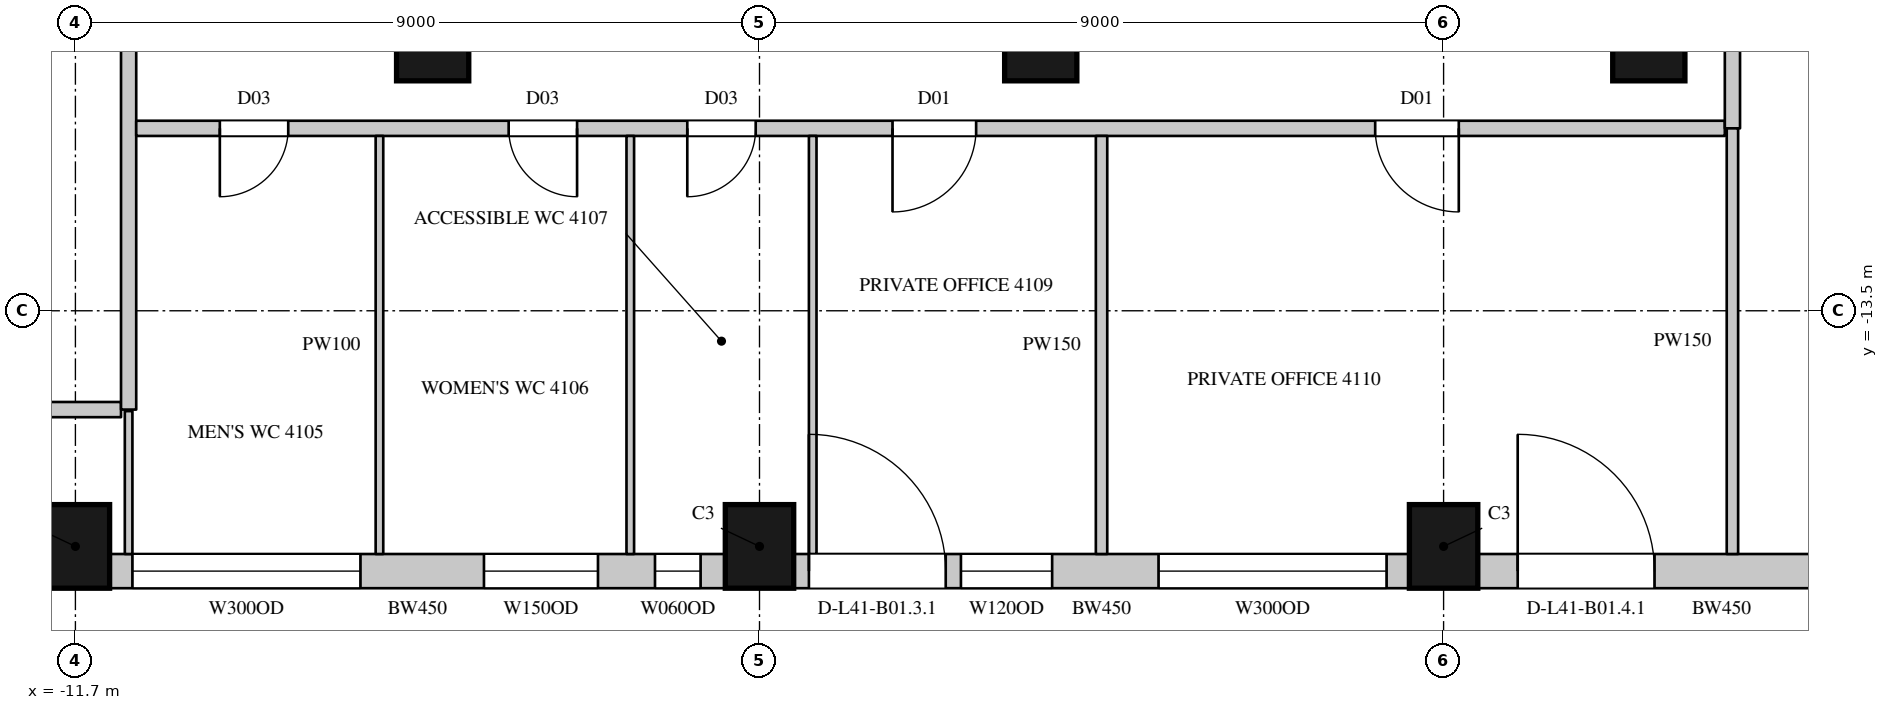
"""IFC4 building model, lengths in metres.
Left out: names, types, materials, properties, quantities, classifications, styles, units other than length and angle.
Written with IfcOpenShell. Run it as: python <this file> out.ifc"""

import sys

from ifc_helpers import new_model, si_unit, direction, frame, frame_2d, origin, origin_2d, place, context, subcontext, project, spatial, rectangle, circle, extrude, element, fill, save


model = new_model("IFC4")
c1 = context("Model", 3, precision=1e-05, world=origin(), true_north=direction((0.0, 1.0)))
c2 = subcontext(c1, "Body", "Model", "MODEL_VIEW")
j1 = project(units=[si_unit("LENGTHUNIT", "METRE"), si_unit("PLANEANGLEUNIT", "RADIAN")], contexts=[c1])
p1 = place(None, origin())
s1 = spatial("IfcSite", under=j1, at=p1, CompositionType="ELEMENT")
p2 = place(p1, origin())
s2 = spatial("IfcBuilding", under=s1, at=p2, CompositionType="ELEMENT")
p3 = place(p2, frame((0.0, 0.0, 189.2)))
s3 = spatial("IfcBuildingStorey", under=s2, at=p3, CompositionType="ELEMENT", Elevation=189.2)
for number, where, z_axis, x_axis in (
    (1, (-11.7, -16.6, 0.0), (0.0, 0.0, 1.0), (1.0, 0.0, 0.0)),
    (2, (-2.7, -16.6, 0.0), (0.0, 0.0, 1.0), (1.0, 0.0, 0.0)),
    (3, (6.3, -16.6, 0.0), (0.0, 0.0, 1.0), (1.0, 0.0, 0.0)),
):
    element("IfcColumn", number, at=place(p3, frame(where, z_axis=z_axis, x_axis=x_axis)), inside=s3, PredefinedType="COLUMN", context=c2, shape_type="SweptSolid", body=[
        extrude(rectangle(XDim=0.9, YDim=1.1, at=origin_2d()), origin(), (0.0, 0.0, 1.0), 4.1),
    ])
for number, where, z_axis, x_axis in (
    (4, (-7.0, -10.0, 0.0), (0.0, 0.0, 1.0), (1.0, 0.0, 0.0)),
    (5, (1.0, -10.0, 0.0), (0.0, 0.0, 1.0), (1.0, 0.0, 0.0)),
    (6, (9.0, -10.0, 0.0), (0.0, 0.0, 1.0), (1.0, 0.0, 0.0)),
):
    element("IfcColumn", number, at=place(p3, frame(where, z_axis=z_axis, x_axis=x_axis)), inside=s3, PredefinedType="COLUMN", context=c2, shape_type="SweptSolid", body=[
        extrude(circle(Radius=0.475, at=origin_2d()), origin(), (0.0, 0.0, 1.0), 4.1),
    ])
p4 = place(p3, frame((-11.25, -16.925, 0.0), z_axis=(0.0, 0.0, 1.0), x_axis=(1.0, 0.0, 0.0)))
e7 = element("IfcWall", 7, at=p4, inside=s3, PredefinedType="SOLIDWALL", context=c2, shape_type="SweptSolid", body=[
    extrude(rectangle(XDim=8.1, YDim=0.45, at=frame_2d((4.05, 0.0))), origin(), (0.0, 0.0, 1.0), 3.8),
])
p5 = place(p4, frame((0.3, 0.0, 1.05)))
e8 = element("IfcOpeningElement", 8, at=p5, cuts=e7, PredefinedType="OPENING", context=c2, shape_type="SweptSolid", body=[
    extrude(rectangle(XDim=3.0, YDim=2.4, at=frame_2d((1.5, 1.2))), frame((0.0, 0.235, 0.0), z_axis=(0.0, -1.0, 0.0), x_axis=(1.0, 0.0, 0.0)), (0.0, 0.0, 1.0), 0.47),
])
p6 = place(p4, frame((4.925, 0.0, 1.05)))
e9 = element("IfcOpeningElement", 9, at=p6, cuts=e7, PredefinedType="OPENING", context=c2, shape_type="SweptSolid", body=[
    extrude(rectangle(XDim=1.5, YDim=2.4, at=frame_2d((0.75, 1.2))), frame((0.0, 0.235, 0.0), z_axis=(0.0, -1.0, 0.0), x_axis=(1.0, 0.0, 0.0)), (0.0, 0.0, 1.0), 0.47),
])
p7 = place(p4, frame((7.175, 0.0, 1.05)))
e10 = element("IfcOpeningElement", 10, at=p7, cuts=e7, PredefinedType="OPENING", context=c2, shape_type="SweptSolid", body=[
    extrude(rectangle(XDim=0.6, YDim=2.4, at=frame_2d((0.3, 1.2))), frame((0.0, 0.235, 0.0), z_axis=(0.0, -1.0, 0.0), x_axis=(1.0, 0.0, 0.0)), (0.0, 0.0, 1.0), 0.47),
])
p8 = place(p3, frame((-2.25, -16.925, 0.0), z_axis=(0.0, 0.0, 1.0), x_axis=(1.0, 0.0, 0.0)))
e11 = element("IfcWall", 11, at=p8, inside=s3, PredefinedType="SOLIDWALL", context=c2, shape_type="SweptSolid", body=[
    extrude(rectangle(XDim=8.1, YDim=0.45, at=frame_2d((4.05, 0.0))), origin(), (0.0, 0.0, 1.0), 3.8),
])
p9 = place(p8, frame((0.2, 0.0, 0.0)))
e12 = element("IfcOpeningElement", 12, at=p9, cuts=e11, PredefinedType="OPENING", context=c2, shape_type="SweptSolid", body=[
    extrude(rectangle(XDim=1.8, YDim=2.4, at=frame_2d((0.9, 1.2))), frame((0.0, 0.235, 0.0), z_axis=(0.0, -1.0, 0.0), x_axis=(1.0, 0.0, 0.0)), (0.0, 0.0, 1.0), 0.47),
])
p10 = place(p8, frame((2.2, 0.0, 1.05)))
e13 = element("IfcOpeningElement", 13, at=p10, cuts=e11, PredefinedType="OPENING", context=c2, shape_type="SweptSolid", body=[
    extrude(rectangle(XDim=1.2, YDim=2.4, at=frame_2d((0.6, 1.2))), frame((0.0, 0.235, 0.0), z_axis=(0.0, -1.0, 0.0), x_axis=(1.0, 0.0, 0.0)), (0.0, 0.0, 1.0), 0.47),
])
p11 = place(p8, frame((4.8, 0.0, 1.05)))
e14 = element("IfcOpeningElement", 14, at=p11, cuts=e11, PredefinedType="OPENING", context=c2, shape_type="SweptSolid", body=[
    extrude(rectangle(XDim=3.0, YDim=2.4, at=frame_2d((1.5, 1.2))), frame((0.0, 0.235, 0.0), z_axis=(0.0, -1.0, 0.0), x_axis=(1.0, 0.0, 0.0)), (0.0, 0.0, 1.0), 0.47),
])
p12 = place(p3, frame((6.75, -16.925, 0.0), z_axis=(0.0, 0.0, 1.0), x_axis=(1.0, 0.0, 0.0)))
e15 = element("IfcWall", 15, at=p12, inside=s3, PredefinedType="SOLIDWALL", context=c2, shape_type="SweptSolid", body=[
    extrude(rectangle(XDim=6.414, YDim=0.45, at=frame_2d((3.207, 0.0))), origin(), (0.0, 0.0, 1.0), 3.8),
])
p13 = place(p12, frame((0.525, 0.0, 0.0)))
e16 = element("IfcOpeningElement", 16, at=p13, cuts=e15, PredefinedType="OPENING", context=c2, shape_type="SweptSolid", body=[
    extrude(rectangle(XDim=1.8, YDim=2.4, at=frame_2d((0.9, 1.2))), frame((0.0, 0.235, 0.0), z_axis=(0.0, -1.0, 0.0), x_axis=(1.0, 0.0, 0.0)), (0.0, 0.0, 1.0), 0.47),
])
p14 = place(p3, frame((-13.97, -14.8, 0.0), z_axis=(0.0, 0.0, 1.0), x_axis=(1.0, 0.0, 0.0)))
e17 = element("IfcWall", 17, at=p14, inside=s3, PredefinedType="PARTITIONING", context=c2, shape_type="SweptSolid", body=[
    extrude(rectangle(XDim=2.87, YDim=0.2, at=frame_2d((1.435, 0.0))), origin(), (0.0, 0.0, 1.0), 3.8),
])
p15 = place(p3, frame((-11.0, -14.8, 0.0), z_axis=(0.0, 0.0, 1.0), x_axis=(0.0, 1.0, 0.0)))
e18 = element("IfcWall", 18, at=p15, inside=s3, PredefinedType="PARTITIONING", context=c2, shape_type="SweptSolid", body=[
    extrude(rectangle(XDim=29.6, YDim=0.2, at=frame_2d((14.8, 0.0))), origin(), (0.0, 0.0, 1.0), 3.8),
])
p16 = place(p15, frame((20.15, 0.0, 0.0)))
e19 = element("IfcOpeningElement", 19, at=p16, cuts=e18, PredefinedType="OPENING", context=c2, shape_type="SweptSolid", body=[
    extrude(rectangle(XDim=1.5, YDim=2.4, at=frame_2d((0.75, 1.2))), frame((0.0, 0.11, 0.0), z_axis=(0.0, -1.0, 0.0), x_axis=(1.0, 0.0, 0.0)), (0.0, 0.0, 1.0), 0.22),
])
p17 = place(p3, frame((-10.9, -11.1, 0.0), z_axis=(0.0, 0.0, 1.0), x_axis=(1.0, 0.0, 0.0)))
e20 = element("IfcWall", 20, at=p17, inside=s3, PredefinedType="PARTITIONING", context=c2, shape_type="SweptSolid", body=[
    extrude(rectangle(XDim=20.9, YDim=0.2, at=frame_2d((10.45, 0.0))), origin(), (0.0, 0.0, 1.0), 3.8),
])
p18 = place(p17, frame((1.1, 0.0, 0.0)))
e21 = element("IfcOpeningElement", 21, at=p18, cuts=e20, PredefinedType="OPENING", context=c2, shape_type="SweptSolid", body=[
    extrude(rectangle(XDim=0.9, YDim=2.2, at=frame_2d((0.45, 1.1))), frame((0.0, 0.11, 0.0), z_axis=(0.0, -1.0, 0.0), x_axis=(1.0, 0.0, 0.0)), (0.0, 0.0, 1.0), 0.22),
])
p19 = place(p17, frame((4.9, 0.0, 0.0)))
e22 = element("IfcOpeningElement", 22, at=p19, cuts=e20, PredefinedType="OPENING", context=c2, shape_type="SweptSolid", body=[
    extrude(rectangle(XDim=0.9, YDim=2.2, at=frame_2d((0.45, 1.1))), frame((0.0, 0.11, 0.0), z_axis=(0.0, -1.0, 0.0), x_axis=(1.0, 0.0, 0.0)), (0.0, 0.0, 1.0), 0.22),
])
p20 = place(p17, frame((7.25, 0.0, 0.0)))
e23 = element("IfcOpeningElement", 23, at=p20, cuts=e20, PredefinedType="OPENING", context=c2, shape_type="SweptSolid", body=[
    extrude(rectangle(XDim=0.9, YDim=2.2, at=frame_2d((0.45, 1.1))), frame((0.0, 0.11, 0.0), z_axis=(0.0, -1.0, 0.0), x_axis=(1.0, 0.0, 0.0)), (0.0, 0.0, 1.0), 0.22),
])
p21 = place(p17, frame((9.95, 0.0, 0.0)))
e24 = element("IfcOpeningElement", 24, at=p21, cuts=e20, PredefinedType="OPENING", context=c2, shape_type="SweptSolid", body=[
    extrude(rectangle(XDim=1.1, YDim=2.4, at=frame_2d((0.55, 1.2))), frame((0.0, 0.11, 0.0), z_axis=(0.0, -1.0, 0.0), x_axis=(1.0, 0.0, 0.0)), (0.0, 0.0, 1.0), 0.22),
])
p22 = place(p17, frame((16.3, 0.0, 0.0)))
e25 = element("IfcOpeningElement", 25, at=p22, cuts=e20, PredefinedType="OPENING", context=c2, shape_type="SweptSolid", body=[
    extrude(rectangle(XDim=1.1, YDim=2.4, at=frame_2d((0.55, 1.2))), frame((0.0, 0.11, 0.0), z_axis=(0.0, -1.0, 0.0), x_axis=(1.0, 0.0, 0.0)), (0.0, 0.0, 1.0), 0.22),
])
p23 = place(p3, frame((10.1, -11.1, 0.0), z_axis=(0.0, 0.0, 1.0), x_axis=(0.0, 1.0, 0.0)))
e26 = element("IfcWall", 26, at=p23, inside=s3, PredefinedType="PARTITIONING", context=c2, shape_type="SweptSolid", body=[
    extrude(rectangle(XDim=23.2, YDim=0.2, at=frame_2d((11.6, 0.0))), origin(), (0.0, 0.0, 1.0), 3.8),
])
p24 = place(p23, frame((8.0, 0.0, 0.0)))
e27 = element("IfcOpeningElement", 27, at=p24, cuts=e26, PredefinedType="OPENING", context=c2, shape_type="SweptSolid", body=[
    extrude(rectangle(XDim=1.5, YDim=2.4, at=frame_2d((0.75, 1.2))), frame((0.0, 0.11, 0.0), z_axis=(0.0, -1.0, 0.0), x_axis=(1.0, 0.0, 0.0)), (0.0, 0.0, 1.0), 0.22),
])
p25 = place(p23, frame((18.95, 0.0, 0.0)))
e28 = element("IfcOpeningElement", 28, at=p25, cuts=e26, PredefinedType="OPENING", context=c2, shape_type="SweptSolid", body=[
    extrude(rectangle(XDim=1.1, YDim=2.4, at=frame_2d((0.55, 1.2))), frame((0.0, 0.11, 0.0), z_axis=(0.0, -1.0, 0.0), x_axis=(1.0, 0.0, 0.0)), (0.0, 0.0, 1.0), 0.22),
])
p26 = place(p23, frame((2.7, 0.0, 0.0)))
e29 = element("IfcOpeningElement", 29, at=p26, cuts=e26, PredefinedType="OPENING", context=c2, shape_type="SweptSolid", body=[
    extrude(rectangle(XDim=1.1, YDim=2.4, at=frame_2d((0.55, 1.2))), frame((0.0, 0.11, 0.0), z_axis=(0.0, -1.0, 0.0), x_axis=(1.0, 0.0, 0.0)), (0.0, 0.0, 1.0), 0.22),
])
p27 = place(p3, frame((1.8, -16.7, 0.0), z_axis=(0.0, 0.0, 1.0), x_axis=(0.0, 1.0, 0.0)))
e30 = element("IfcWall", 30, at=p27, inside=s3, PredefinedType="PARTITIONING", context=c2, shape_type="SweptSolid", body=[
    extrude(rectangle(XDim=5.5, YDim=0.15, at=frame_2d((2.75, 0.0))), origin(), (0.0, 0.0, 1.0), 3.15),
])
p28 = place(p3, frame((10.1, -16.7, 0.0), z_axis=(0.0, 0.0, 1.0), x_axis=(0.0, 1.0, 0.0)))
e31 = element("IfcWall", 31, at=p28, inside=s3, PredefinedType="PARTITIONING", context=c2, shape_type="SweptSolid", body=[
    extrude(rectangle(XDim=5.6, YDim=0.15, at=frame_2d((2.8, 0.0))), origin(), (0.0, 0.0, 1.0), 3.8),
])
p29 = place(p3, frame((-11.0, -16.7, 0.0), z_axis=(0.0, 0.0, 1.0), x_axis=(0.0, 1.0, 0.0)))
e32 = element("IfcWall", 32, at=p29, inside=s3, PredefinedType="PARTITIONING", context=c2, shape_type="SweptSolid", body=[
    extrude(rectangle(XDim=1.88, YDim=0.1, at=frame_2d((0.94, 0.0))), origin(), (0.0, 0.0, 1.0), 3.8),
])
for number, where, z_axis, x_axis in (
    (33, (-7.7, -16.7, 0.0), (0.0, 0.0, 1.0), (0.0, 1.0, 0.0)),
    (34, (-4.4, -16.7, 0.0), (0.0, 0.0, 1.0), (0.0, 1.0, 0.0)),
    (35, (-2.0, -16.7, 0.0), (0.0, 0.0, 1.0), (0.0, 1.0, 0.0)),
):
    element("IfcWall", number, at=place(p3, frame(where, z_axis=z_axis, x_axis=x_axis)), inside=s3, PredefinedType="PARTITIONING", context=c2, shape_type="SweptSolid", body=[
        extrude(rectangle(XDim=5.5, YDim=0.1, at=frame_2d((2.75, 0.0))), origin(), (0.0, 0.0, 1.0), 3.8),
    ])
p30 = place(p5, origin())
e36 = element("IfcWindow", 36, at=p30, inside=s3, PartitioningType="SINGLE_PANEL", PredefinedType="WINDOW", context=c2, shape_type="SweptSolid", body=[
    extrude(rectangle(XDim=3.0, YDim=2.4, at=frame_2d((1.5, 1.2))), frame((0.0, 0.135, 0.0), z_axis=(0.0, -1.0, 0.0), x_axis=(1.0, 0.0, 0.0)), (0.0, 0.0, 1.0), 0.06),
])
fill(e8, e36)
p31 = place(p9, origin())
e37 = element("IfcDoor", 37, at=p31, inside=s3, OperationType="SLIDING_TO_LEFT", PredefinedType="DOOR", context=c2, shape_type="SweptSolid", body=[
    extrude(rectangle(XDim=1.8, YDim=2.4, at=frame_2d((0.9, 1.2))), frame((0.0, 0.13, 0.0), z_axis=(0.0, -1.0, 0.0), x_axis=(1.0, 0.0, 0.0)), (0.0, 0.0, 1.0), 0.05),
])
fill(e12, e37)
p32 = place(p10, origin())
e38 = element("IfcWindow", 38, at=p32, inside=s3, PartitioningType="SINGLE_PANEL", PredefinedType="WINDOW", context=c2, shape_type="SweptSolid", body=[
    extrude(rectangle(XDim=1.2, YDim=2.4, at=frame_2d((0.6, 1.2))), frame((0.0, 0.135, 0.0), z_axis=(0.0, -1.0, 0.0), x_axis=(1.0, 0.0, 0.0)), (0.0, 0.0, 1.0), 0.06),
])
fill(e13, e38)
p33 = place(p11, origin())
e39 = element("IfcWindow", 39, at=p33, inside=s3, PartitioningType="SINGLE_PANEL", PredefinedType="WINDOW", context=c2, shape_type="SweptSolid", body=[
    extrude(rectangle(XDim=3.0, YDim=2.4, at=frame_2d((1.5, 1.2))), frame((0.0, 0.135, 0.0), z_axis=(0.0, -1.0, 0.0), x_axis=(1.0, 0.0, 0.0)), (0.0, 0.0, 1.0), 0.06),
])
fill(e14, e39)
p34 = place(p13, origin())
e40 = element("IfcDoor", 40, at=p34, inside=s3, OperationType="SLIDING_TO_LEFT", PredefinedType="DOOR", context=c2, shape_type="SweptSolid", body=[
    extrude(rectangle(XDim=1.8, YDim=2.4, at=frame_2d((0.9, 1.2))), frame((0.0, 0.13, 0.0), z_axis=(0.0, -1.0, 0.0), x_axis=(1.0, 0.0, 0.0)), (0.0, 0.0, 1.0), 0.05),
])
fill(e16, e40)
p35 = place(p18, origin())
e41 = element("IfcDoor", 41, at=p35, inside=s3, OperationType="SINGLE_SWING_RIGHT", PredefinedType="DOOR", context=c2, shape_type="SweptSolid", body=[
    extrude(rectangle(XDim=0.9, YDim=2.2, at=frame_2d((0.45, 1.1))), frame((0.0, 0.025, 0.0), z_axis=(0.0, -1.0, 0.0), x_axis=(1.0, 0.0, 0.0)), (0.0, 0.0, 1.0), 0.05),
])
fill(e21, e41)
p36 = place(p19, origin())
e42 = element("IfcDoor", 42, at=p36, inside=s3, OperationType="SINGLE_SWING_LEFT", PredefinedType="DOOR", context=c2, shape_type="SweptSolid", body=[
    extrude(rectangle(XDim=0.9, YDim=2.2, at=frame_2d((0.45, 1.1))), frame((0.0, 0.025, 0.0), z_axis=(0.0, -1.0, 0.0), x_axis=(1.0, 0.0, 0.0)), (0.0, 0.0, 1.0), 0.05),
])
fill(e22, e42)
p37 = place(p20, origin())
e43 = element("IfcDoor", 43, at=p37, inside=s3, OperationType="SINGLE_SWING_RIGHT", PredefinedType="DOOR", context=c2, shape_type="SweptSolid", body=[
    extrude(rectangle(XDim=0.9, YDim=2.2, at=frame_2d((0.45, 1.1))), frame((0.0, 0.025, 0.0), z_axis=(0.0, -1.0, 0.0), x_axis=(1.0, 0.0, 0.0)), (0.0, 0.0, 1.0), 0.05),
])
fill(e23, e43)
p38 = place(p21, origin())
e44 = element("IfcDoor", 44, at=p38, inside=s3, OperationType="SINGLE_SWING_RIGHT", PredefinedType="DOOR", context=c2, shape_type="SweptSolid", body=[
    extrude(rectangle(XDim=1.1, YDim=2.4, at=frame_2d((0.55, 1.2))), frame((0.0, 0.025, 0.0), z_axis=(0.0, -1.0, 0.0), x_axis=(1.0, 0.0, 0.0)), (0.0, 0.0, 1.0), 0.05),
])
fill(e24, e44)
p39 = place(p22, origin())
e45 = element("IfcDoor", 45, at=p39, inside=s3, OperationType="SINGLE_SWING_LEFT", PredefinedType="DOOR", context=c2, shape_type="SweptSolid", body=[
    extrude(rectangle(XDim=1.1, YDim=2.4, at=frame_2d((0.55, 1.2))), frame((0.0, 0.025, 0.0), z_axis=(0.0, -1.0, 0.0), x_axis=(1.0, 0.0, 0.0)), (0.0, 0.0, 1.0), 0.05),
])
fill(e25, e45)
p40 = place(p6, origin())
e46 = element("IfcWindow", 46, at=p40, inside=s3, PartitioningType="SINGLE_PANEL", PredefinedType="WINDOW", context=c2, shape_type="SweptSolid", body=[
    extrude(rectangle(XDim=1.5, YDim=2.4, at=frame_2d((0.75, 1.2))), frame((0.0, 0.135, 0.0), z_axis=(0.0, -1.0, 0.0), x_axis=(1.0, 0.0, 0.0)), (0.0, 0.0, 1.0), 0.06),
])
fill(e9, e46)
p41 = place(p7, origin())
e47 = element("IfcWindow", 47, at=p41, inside=s3, PartitioningType="SINGLE_PANEL", PredefinedType="WINDOW", context=c2, shape_type="SweptSolid", body=[
    extrude(rectangle(XDim=0.6, YDim=2.4, at=frame_2d((0.3, 1.2))), frame((0.0, 0.135, 0.0), z_axis=(0.0, -1.0, 0.0), x_axis=(1.0, 0.0, 0.0)), (0.0, 0.0, 1.0), 0.06),
])
fill(e10, e47)
save(model, sys.argv[1])
